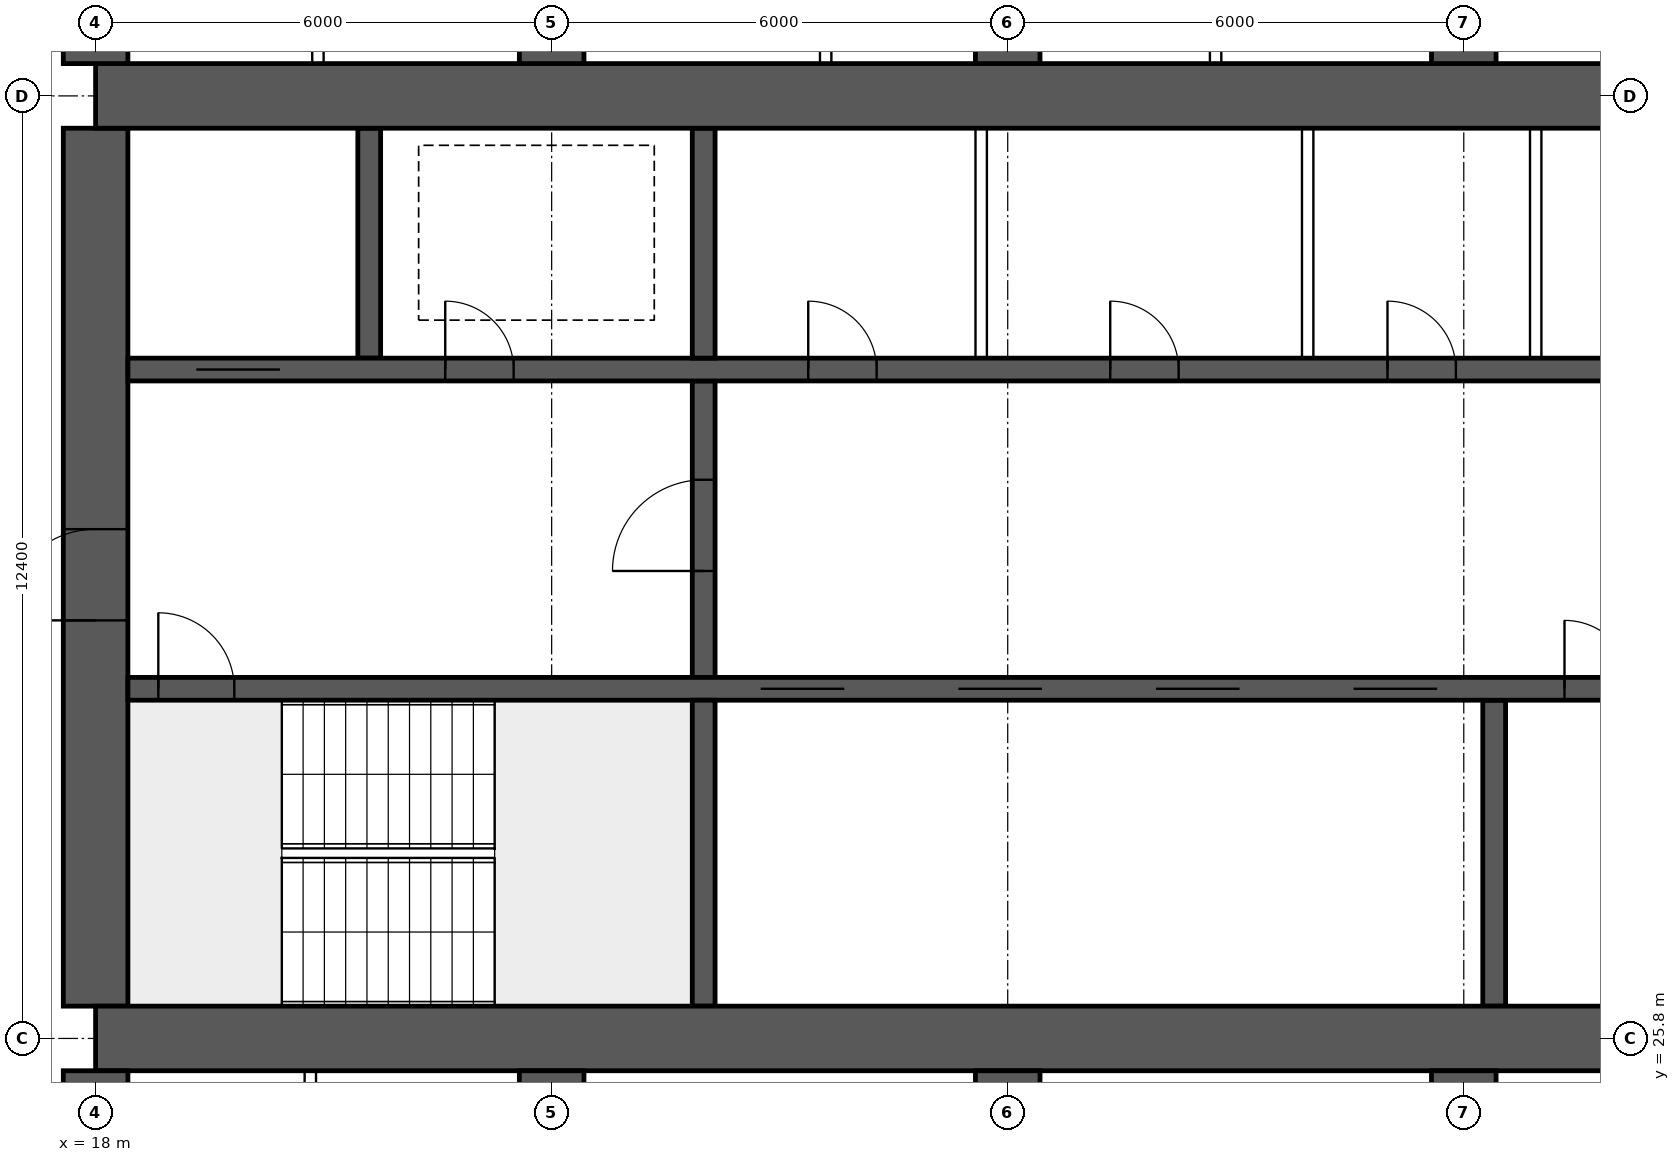
"""IFC4 building model, lengths in metres.
Left out: names, types, materials, properties, quantities, classifications, styles, units other than length and angle.
Written with IfcOpenShell. Run it as: python <this file> out.ifc"""

import sys

from ifc_helpers import new_model, si_unit, direction, frame, frame_2d, origin, place, context, subcontext, project, spatial, rectangle, extrude, element, fill, save


model = new_model("IFC4")
c1 = context("Model", 3, precision=1e-05, world=origin(), true_north=direction((0.0, 1.0)))
c2 = subcontext(c1, "Body", "Model", "MODEL_VIEW")
j1 = project(units=[si_unit("LENGTHUNIT", "METRE"), si_unit("PLANEANGLEUNIT", "RADIAN")], contexts=[c1])
p1 = place(None, origin())
s1 = spatial("IfcSite", under=j1, at=p1, CompositionType="ELEMENT")
p2 = place(p1, origin())
s2 = spatial("IfcBuilding", under=s1, at=p2, CompositionType="ELEMENT")
p3 = place(p2, frame((0.0, 0.0, 193.6)))
s3 = spatial("IfcBuildingStorey", under=s2, at=p3, CompositionType="ELEMENT", Elevation=193.6)
for number, where, z_axis, x_axis in (
    (1, (18.0, 25.8, 0.0), (0.0, 0.0, 1.0), (1.0, 0.0, 0.0)),
    (2, (18.0, 38.2, 0.0), (0.0, 0.0, 1.0), (1.0, 0.0, 0.0)),
):
    element("IfcWall", number, at=place(p3, frame(where, z_axis=z_axis, x_axis=x_axis)), inside=s3, PredefinedType="SHEAR", context=c2, shape_type="SweptSolid", body=[
        extrude(rectangle(XDim=48.0, YDim=0.85, at=frame_2d((24.0, 0.0))), origin(), (0.0, 0.0, 1.0), 3.75),
    ])
p4 = place(p3, frame((18.0, 26.225, 0.0), z_axis=(0.0, 0.0, 1.0), x_axis=(0.0, 1.0, 0.0)))
e3 = element("IfcWall", 3, at=p4, inside=s3, PredefinedType="SHEAR", context=c2, shape_type="SweptSolid", body=[
    extrude(rectangle(XDim=11.55, YDim=0.85, at=frame_2d((5.775, 0.0))), origin(), (0.0, 0.0, 1.0), 3.75),
])
p5 = place(p4, frame((5.075, 0.0, 0.0)))
e4 = element("IfcOpeningElement", 4, at=p5, cuts=e3, PredefinedType="OPENING", context=c2, shape_type="SweptSolid", body=[
    extrude(rectangle(XDim=1.2, YDim=2.1, at=frame_2d((0.6, 1.05))), frame((0.0, 0.435, 0.0), z_axis=(0.0, -1.0, 0.0), x_axis=(1.0, 0.0, 0.0)), (0.0, 0.0, 1.0), 0.87),
])
p6 = place(p3, frame((18.425, 30.4, 0.0), z_axis=(0.0, 0.0, 1.0), x_axis=(1.0, 0.0, 0.0)))
e5 = element("IfcWall", 5, at=p6, inside=s3, PredefinedType="SHEAR", context=c2, shape_type="SweptSolid", body=[
    extrude(rectangle(XDim=47.15, YDim=0.3, at=frame_2d((23.575, 0.0))), origin(), (0.0, 0.0, 1.0), 3.75),
])
p7 = place(p6, frame((0.4, 0.0, 0.0)))
e6 = element("IfcOpeningElement", 6, at=p7, cuts=e5, PredefinedType="OPENING", context=c2, shape_type="SweptSolid", body=[
    extrude(rectangle(XDim=1.0, YDim=2.1, at=frame_2d((0.5, 1.05))), frame((0.0, 0.16, 0.0), z_axis=(0.0, -1.0, 0.0), x_axis=(1.0, 0.0, 0.0)), (0.0, 0.0, 1.0), 0.32),
])
p8 = place(p6, frame((45.75, 0.0, 0.0)))
e7 = element("IfcOpeningElement", 7, at=p8, cuts=e5, PredefinedType="OPENING", context=c2, shape_type="SweptSolid", body=[
    extrude(rectangle(XDim=1.0, YDim=2.1, at=frame_2d((0.5, 1.05))), frame((0.0, 0.16, 0.0), z_axis=(0.0, -1.0, 0.0), x_axis=(1.0, 0.0, 0.0)), (0.0, 0.0, 1.0), 0.32),
])
p9 = place(p6, frame((8.325, 0.0, 0.0)))
e8 = element("IfcOpeningElement", 8, at=p9, cuts=e5, PredefinedType="OPENING", context=c2, shape_type="SweptSolid", body=[
    extrude(rectangle(XDim=1.1, YDim=2.1, at=frame_2d((0.55, 1.05))), frame((0.0, 0.16, 0.0), z_axis=(0.0, -1.0, 0.0), x_axis=(1.0, 0.0, 0.0)), (0.0, 0.0, 1.0), 0.32),
])
p10 = place(p6, frame((10.925, 0.0, 0.0)))
e9 = element("IfcOpeningElement", 9, at=p10, cuts=e5, PredefinedType="OPENING", context=c2, shape_type="SweptSolid", body=[
    extrude(rectangle(XDim=1.1, YDim=2.1, at=frame_2d((0.55, 1.05))), frame((0.0, 0.16, 0.0), z_axis=(0.0, -1.0, 0.0), x_axis=(1.0, 0.0, 0.0)), (0.0, 0.0, 1.0), 0.32),
])
p11 = place(p6, frame((13.525, 0.0, 0.0)))
e10 = element("IfcOpeningElement", 10, at=p11, cuts=e5, PredefinedType="OPENING", context=c2, shape_type="SweptSolid", body=[
    extrude(rectangle(XDim=1.1, YDim=2.1, at=frame_2d((0.55, 1.05))), frame((0.0, 0.16, 0.0), z_axis=(0.0, -1.0, 0.0), x_axis=(1.0, 0.0, 0.0)), (0.0, 0.0, 1.0), 0.32),
])
p12 = place(p6, frame((16.125, 0.0, 0.0)))
e11 = element("IfcOpeningElement", 11, at=p12, cuts=e5, PredefinedType="OPENING", context=c2, shape_type="SweptSolid", body=[
    extrude(rectangle(XDim=1.1, YDim=2.1, at=frame_2d((0.55, 1.05))), frame((0.0, 0.16, 0.0), z_axis=(0.0, -1.0, 0.0), x_axis=(1.0, 0.0, 0.0)), (0.0, 0.0, 1.0), 0.32),
])
p13 = place(p6, frame((18.9, 0.0, 0.0)))
e12 = element("IfcOpeningElement", 12, at=p13, cuts=e5, PredefinedType="OPENING", context=c2, shape_type="SweptSolid", body=[
    extrude(rectangle(XDim=0.9, YDim=2.1, at=frame_2d((0.45, 1.05))), frame((0.0, 0.16, 0.0), z_axis=(0.0, -1.0, 0.0), x_axis=(1.0, 0.0, 0.0)), (0.0, 0.0, 1.0), 0.32),
])
p14 = place(p6, frame((30.192, 0.0, 0.0)))
e13 = element("IfcOpeningElement", 13, at=p14, cuts=e5, PredefinedType="OPENING", context=c2, shape_type="SweptSolid", body=[
    extrude(rectangle(XDim=1.1, YDim=2.1, at=frame_2d((0.55, 1.05))), frame((0.0, 0.16, 0.0), z_axis=(0.0, -1.0, 0.0), x_axis=(1.0, 0.0, 0.0)), (0.0, 0.0, 1.0), 0.32),
])
p15 = place(p6, frame((33.725, 0.0, 0.0)))
e14 = element("IfcOpeningElement", 14, at=p15, cuts=e5, PredefinedType="OPENING", context=c2, shape_type="SweptSolid", body=[
    extrude(rectangle(XDim=1.1, YDim=2.1, at=frame_2d((0.55, 1.05))), frame((0.0, 0.16, 0.0), z_axis=(0.0, -1.0, 0.0), x_axis=(1.0, 0.0, 0.0)), (0.0, 0.0, 1.0), 0.32),
])
p16 = place(p6, frame((37.258, 0.0, 0.0)))
e15 = element("IfcOpeningElement", 15, at=p16, cuts=e5, PredefinedType="OPENING", context=c2, shape_type="SweptSolid", body=[
    extrude(rectangle(XDim=1.1, YDim=2.1, at=frame_2d((0.55, 1.05))), frame((0.0, 0.16, 0.0), z_axis=(0.0, -1.0, 0.0), x_axis=(1.0, 0.0, 0.0)), (0.0, 0.0, 1.0), 0.32),
])
p17 = place(p3, frame((18.425, 34.6, 0.0), z_axis=(0.0, 0.0, 1.0), x_axis=(1.0, 0.0, 0.0)))
e16 = element("IfcWall", 16, at=p17, inside=s3, PredefinedType="SHEAR", context=c2, shape_type="SweptSolid", body=[
    extrude(rectangle(XDim=47.15, YDim=0.3, at=frame_2d((23.575, 0.0))), origin(), (0.0, 0.0, 1.0), 3.75),
])
p18 = place(p17, frame((0.9, 0.0, 0.0)))
e17 = element("IfcOpeningElement", 17, at=p18, cuts=e16, PredefinedType="OPENING", context=c2, shape_type="SweptSolid", body=[
    extrude(rectangle(XDim=1.1, YDim=2.1, at=frame_2d((0.55, 1.05))), frame((0.0, 0.16, 0.0), z_axis=(0.0, -1.0, 0.0), x_axis=(1.0, 0.0, 0.0)), (0.0, 0.0, 1.0), 0.32),
])
p19 = place(p17, frame((45.15, 0.0, 0.0)))
e18 = element("IfcOpeningElement", 18, at=p19, cuts=e16, PredefinedType="OPENING", context=c2, shape_type="SweptSolid", body=[
    extrude(rectangle(XDim=1.1, YDim=2.1, at=frame_2d((0.55, 1.05))), frame((0.0, 0.16, 0.0), z_axis=(0.0, -1.0, 0.0), x_axis=(1.0, 0.0, 0.0)), (0.0, 0.0, 1.0), 0.32),
])
p20 = place(p17, frame((4.175, 0.0, 0.0)))
e19 = element("IfcOpeningElement", 19, at=p20, cuts=e16, PredefinedType="OPENING", context=c2, shape_type="SweptSolid", body=[
    extrude(rectangle(XDim=0.9, YDim=2.1, at=frame_2d((0.45, 1.05))), frame((0.0, 0.16, 0.0), z_axis=(0.0, -1.0, 0.0), x_axis=(1.0, 0.0, 0.0)), (0.0, 0.0, 1.0), 0.32),
])
p21 = place(p17, frame((42.075, 0.0, 0.0)))
e20 = element("IfcOpeningElement", 20, at=p21, cuts=e16, PredefinedType="OPENING", context=c2, shape_type="SweptSolid", body=[
    extrude(rectangle(XDim=0.9, YDim=2.1, at=frame_2d((0.45, 1.05))), frame((0.0, 0.16, 0.0), z_axis=(0.0, -1.0, 0.0), x_axis=(1.0, 0.0, 0.0)), (0.0, 0.0, 1.0), 0.32),
])
p22 = place(p17, frame((8.95, 0.0, 0.0)))
e21 = element("IfcOpeningElement", 21, at=p22, cuts=e16, PredefinedType="OPENING", context=c2, shape_type="SweptSolid", body=[
    extrude(rectangle(XDim=0.9, YDim=2.1, at=frame_2d((0.45, 1.05))), frame((0.0, 0.16, 0.0), z_axis=(0.0, -1.0, 0.0), x_axis=(1.0, 0.0, 0.0)), (0.0, 0.0, 1.0), 0.32),
])
p23 = place(p17, frame((12.924, 0.0, 0.0)))
e22 = element("IfcOpeningElement", 22, at=p23, cuts=e16, PredefinedType="OPENING", context=c2, shape_type="SweptSolid", body=[
    extrude(rectangle(XDim=0.9, YDim=2.1, at=frame_2d((0.45, 1.05))), frame((0.0, 0.16, 0.0), z_axis=(0.0, -1.0, 0.0), x_axis=(1.0, 0.0, 0.0)), (0.0, 0.0, 1.0), 0.32),
])
p24 = place(p17, frame((16.571, 0.0, 0.0)))
e23 = element("IfcOpeningElement", 23, at=p24, cuts=e16, PredefinedType="OPENING", context=c2, shape_type="SweptSolid", body=[
    extrude(rectangle(XDim=0.9, YDim=2.1, at=frame_2d((0.45, 1.05))), frame((0.0, 0.16, 0.0), z_axis=(0.0, -1.0, 0.0), x_axis=(1.0, 0.0, 0.0)), (0.0, 0.0, 1.0), 0.32),
])
p25 = place(p17, frame((20.33, 0.0, 0.0)))
e24 = element("IfcOpeningElement", 24, at=p25, cuts=e16, PredefinedType="OPENING", context=c2, shape_type="SweptSolid", body=[
    extrude(rectangle(XDim=0.9, YDim=2.1, at=frame_2d((0.45, 1.05))), frame((0.0, 0.16, 0.0), z_axis=(0.0, -1.0, 0.0), x_axis=(1.0, 0.0, 0.0)), (0.0, 0.0, 1.0), 0.32),
])
p26 = place(p17, frame((24.736, 0.0, 0.0)))
e25 = element("IfcOpeningElement", 25, at=p26, cuts=e16, PredefinedType="OPENING", context=c2, shape_type="SweptSolid", body=[
    extrude(rectangle(XDim=0.9, YDim=2.1, at=frame_2d((0.45, 1.05))), frame((0.0, 0.16, 0.0), z_axis=(0.0, -1.0, 0.0), x_axis=(1.0, 0.0, 0.0)), (0.0, 0.0, 1.0), 0.32),
])
p27 = place(p17, frame((27.533, 0.0, 0.0)))
e26 = element("IfcOpeningElement", 26, at=p27, cuts=e16, PredefinedType="OPENING", context=c2, shape_type="SweptSolid", body=[
    extrude(rectangle(XDim=0.9, YDim=2.1, at=frame_2d((0.45, 1.05))), frame((0.0, 0.16, 0.0), z_axis=(0.0, -1.0, 0.0), x_axis=(1.0, 0.0, 0.0)), (0.0, 0.0, 1.0), 0.32),
])
p28 = place(p17, frame((29.703, 0.0, 0.0)))
e27 = element("IfcOpeningElement", 27, at=p28, cuts=e16, PredefinedType="OPENING", context=c2, shape_type="SweptSolid", body=[
    extrude(rectangle(XDim=0.9, YDim=2.1, at=frame_2d((0.45, 1.05))), frame((0.0, 0.16, 0.0), z_axis=(0.0, -1.0, 0.0), x_axis=(1.0, 0.0, 0.0)), (0.0, 0.0, 1.0), 0.32),
])
p29 = place(p17, frame((33.502, 0.0, 0.0)))
e28 = element("IfcOpeningElement", 28, at=p29, cuts=e16, PredefinedType="OPENING", context=c2, shape_type="SweptSolid", body=[
    extrude(rectangle(XDim=0.9, YDim=2.1, at=frame_2d((0.45, 1.05))), frame((0.0, 0.16, 0.0), z_axis=(0.0, -1.0, 0.0), x_axis=(1.0, 0.0, 0.0)), (0.0, 0.0, 1.0), 0.32),
])
p30 = place(p17, frame((37.453, 0.0, 0.0)))
e29 = element("IfcOpeningElement", 29, at=p30, cuts=e16, PredefinedType="OPENING", context=c2, shape_type="SweptSolid", body=[
    extrude(rectangle(XDim=0.9, YDim=2.1, at=frame_2d((0.45, 1.05))), frame((0.0, 0.16, 0.0), z_axis=(0.0, -1.0, 0.0), x_axis=(1.0, 0.0, 0.0)), (0.0, 0.0, 1.0), 0.32),
])
p31 = place(p3, frame((26.0, 26.225, 0.0), z_axis=(0.0, 0.0, 1.0), x_axis=(0.0, 1.0, 0.0)))
e30 = element("IfcWall", 30, at=p31, inside=s3, PredefinedType="SHEAR", context=c2, shape_type="SweptSolid", body=[
    extrude(rectangle(XDim=4.025, YDim=0.3, at=frame_2d((2.012, 0.0))), origin(), (0.0, 0.0, 1.0), 3.75),
])
p32 = place(p3, frame((26.0, 30.55, 0.0), z_axis=(0.0, 0.0, 1.0), x_axis=(0.0, 1.0, 0.0)))
e31 = element("IfcWall", 31, at=p32, inside=s3, PredefinedType="SHEAR", context=c2, shape_type="SweptSolid", body=[
    extrude(rectangle(XDim=3.9, YDim=0.3, at=frame_2d((1.95, 0.0))), origin(), (0.0, 0.0, 1.0), 3.75),
])
p33 = place(p32, frame((1.4, 0.0, 0.0)))
e32 = element("IfcOpeningElement", 32, at=p33, cuts=e31, PredefinedType="OPENING", context=c2, shape_type="SweptSolid", body=[
    extrude(rectangle(XDim=1.2, YDim=2.1, at=frame_2d((0.6, 1.05))), frame((0.0, 0.16, 0.0), z_axis=(0.0, -1.0, 0.0), x_axis=(1.0, 0.0, 0.0)), (0.0, 0.0, 1.0), 0.32),
])
for number, where, z_axis, x_axis in (
    (33, (21.6, 34.75, 0.0), (0.0, 0.0, 1.0), (0.0, 1.0, 0.0)),
    (34, (26.0, 34.75, 0.0), (0.0, 0.0, 1.0), (0.0, 1.0, 0.0)),
):
    element("IfcWall", number, at=place(p3, frame(where, z_axis=z_axis, x_axis=x_axis)), inside=s3, PredefinedType="SHEAR", context=c2, shape_type="SweptSolid", body=[
        extrude(rectangle(XDim=3.025, YDim=0.3, at=frame_2d((1.512, 0.0))), origin(), (0.0, 0.0, 1.0), 3.75),
    ])
p34 = place(p3, frame((36.4, 26.225, 0.0), z_axis=(0.0, 0.0, 1.0), x_axis=(0.0, 1.0, 0.0)))
e35 = element("IfcWall", 35, at=p34, inside=s3, PredefinedType="SHEAR", context=c2, shape_type="SweptSolid", body=[
    extrude(rectangle(XDim=4.025, YDim=0.3, at=frame_2d((2.012, 0.0))), origin(), (0.0, 0.0, 1.0), 3.75),
])
for number, where, z_axis, x_axis in (
    (36, (18.0, 17.2, 0.0), (0.0, 0.0, 1.0), (0.0, 1.0, 0.0)),
    (37, (18.0, 38.625, 0.0), (0.0, 0.0, 1.0), (0.0, 1.0, 0.0)),
    (38, (24.0, 17.2, 0.0), (0.0, 0.0, 1.0), (0.0, 1.0, 0.0)),
    (39, (24.0, 38.625, 0.0), (0.0, 0.0, 1.0), (0.0, 1.0, 0.0)),
    (40, (30.0, 17.2, 0.0), (0.0, 0.0, 1.0), (0.0, 1.0, 0.0)),
    (41, (30.0, 38.625, 0.0), (0.0, 0.0, 1.0), (0.0, 1.0, 0.0)),
    (42, (36.0, 17.2, 0.0), (0.0, 0.0, 1.0), (0.0, 1.0, 0.0)),
    (43, (36.0, 38.625, 0.0), (0.0, 0.0, 1.0), (0.0, 1.0, 0.0)),
):
    element("IfcWall", number, at=place(p3, frame(where, z_axis=z_axis, x_axis=x_axis)), inside=s3, PredefinedType="SHEAR", context=c2, shape_type="SweptSolid", body=[
        extrude(rectangle(XDim=8.175, YDim=0.85, at=frame_2d((4.087, 0.0))), origin(), (0.0, 0.0, 1.0), 3.75),
    ])
for number, where, z_axis, x_axis in (
    (44, (29.651, 34.75, 0.0), (0.0, 0.0, 1.0), (0.0, 1.0, 0.0)),
    (45, (33.946, 34.75, 0.0), (0.0, 0.0, 1.0), (0.0, 1.0, 0.0)),
    (46, (36.946, 34.75, 0.0), (0.0, 0.0, 1.0), (0.0, 1.0, 0.0)),
):
    element("IfcWall", number, at=place(p3, frame(where, z_axis=z_axis, x_axis=x_axis)), inside=s3, PredefinedType="SOLIDWALL", context=c2, shape_type="SweptSolid", body=[
        extrude(rectangle(XDim=3.025, YDim=0.15, at=frame_2d((1.512, 0.0))), origin(), (0.0, 0.0, 1.0), 3.5),
    ])
for number, where, z_axis, x_axis in (
    (47, (20.825, 17.3, 0.0), (0.0, 0.0, 1.0), (0.0, 1.0, 0.0)),
    (48, (20.925, 38.625, 0.0), (0.0, 0.0, 1.0), (0.0, 1.0, 0.0)),
    (49, (27.605, 38.625, 0.0), (0.0, 0.0, 1.0), (0.0, 1.0, 0.0)),
    (50, (32.735, 38.625, 0.0), (0.0, 0.0, 1.0), (0.0, 1.0, 0.0)),
):
    element("IfcWall", number, at=place(p3, frame(where, z_axis=z_axis, x_axis=x_axis)), inside=s3, PredefinedType="PARTITIONING", context=c2, shape_type="SweptSolid", body=[
        extrude(rectangle(XDim=8.075, YDim=0.15, at=frame_2d((4.038, 0.0))), origin(), (0.0, 0.0, 1.0), 3.5),
    ])
p35 = place(p5, origin())
e51 = element("IfcDoor", 51, at=p35, inside=s3, OperationType="SINGLE_SWING_LEFT", PredefinedType="DOOR", context=c2, shape_type="SweptSolid", body=[
    extrude(rectangle(XDim=1.2, YDim=2.1, at=frame_2d((0.6, 1.05))), frame((0.0, 0.025, 0.0), z_axis=(0.0, -1.0, 0.0), x_axis=(1.0, 0.0, 0.0)), (0.0, 0.0, 1.0), 0.05),
])
fill(e4, e51)
p36 = place(p7, origin())
e52 = element("IfcDoor", 52, at=p36, inside=s3, OperationType="SINGLE_SWING_LEFT", PredefinedType="DOOR", context=c2, shape_type="SweptSolid", body=[
    extrude(rectangle(XDim=1.0, YDim=2.1, at=frame_2d((0.5, 1.05))), frame((0.0, 0.025, 0.0), z_axis=(0.0, -1.0, 0.0), x_axis=(1.0, 0.0, 0.0)), (0.0, 0.0, 1.0), 0.05),
])
fill(e6, e52)
p37 = place(p18, origin())
e53 = element("IfcDoor", 53, at=p37, inside=s3, OperationType="DOUBLE_DOOR_SLIDING", PredefinedType="DOOR", context=c2, shape_type="SweptSolid", body=[
    extrude(rectangle(XDim=1.1, YDim=2.1, at=frame_2d((0.55, 1.05))), frame((0.0, 0.025, 0.0), z_axis=(0.0, -1.0, 0.0), x_axis=(1.0, 0.0, 0.0)), (0.0, 0.0, 1.0), 0.05),
])
fill(e17, e53)
p38 = place(p20, origin())
e54 = element("IfcDoor", 54, at=p38, inside=s3, OperationType="SINGLE_SWING_LEFT", PredefinedType="DOOR", context=c2, shape_type="SweptSolid", body=[
    extrude(rectangle(XDim=0.9, YDim=2.1, at=frame_2d((0.45, 1.05))), frame((0.0, 0.025, 0.0), z_axis=(0.0, -1.0, 0.0), x_axis=(1.0, 0.0, 0.0)), (0.0, 0.0, 1.0), 0.05),
])
fill(e19, e54)
p39 = place(p33, origin())
e55 = element("IfcDoor", 55, at=p39, inside=s3, OperationType="SINGLE_SWING_LEFT", PredefinedType="DOOR", context=c2, shape_type="SweptSolid", body=[
    extrude(rectangle(XDim=1.2, YDim=2.1, at=frame_2d((0.6, 1.05))), frame((0.0, 0.025, 0.0), z_axis=(0.0, -1.0, 0.0), x_axis=(1.0, 0.0, 0.0)), (0.0, 0.0, 1.0), 0.05),
])
fill(e32, e55)
p40 = place(p22, origin())
e56 = element("IfcDoor", 56, at=p40, inside=s3, OperationType="SINGLE_SWING_LEFT", PredefinedType="DOOR", context=c2, shape_type="SweptSolid", body=[
    extrude(rectangle(XDim=0.9, YDim=2.1, at=frame_2d((0.45, 1.05))), frame((0.0, 0.025, 0.0), z_axis=(0.0, -1.0, 0.0), x_axis=(1.0, 0.0, 0.0)), (0.0, 0.0, 1.0), 0.05),
])
fill(e21, e56)
p41 = place(p23, origin())
e57 = element("IfcDoor", 57, at=p41, inside=s3, OperationType="SINGLE_SWING_LEFT", PredefinedType="DOOR", context=c2, shape_type="SweptSolid", body=[
    extrude(rectangle(XDim=0.9, YDim=2.1, at=frame_2d((0.45, 1.05))), frame((0.0, 0.025, 0.0), z_axis=(0.0, -1.0, 0.0), x_axis=(1.0, 0.0, 0.0)), (0.0, 0.0, 1.0), 0.05),
])
fill(e22, e57)
p42 = place(p24, origin())
e58 = element("IfcDoor", 58, at=p42, inside=s3, OperationType="SINGLE_SWING_LEFT", PredefinedType="DOOR", context=c2, shape_type="SweptSolid", body=[
    extrude(rectangle(XDim=0.9, YDim=2.1, at=frame_2d((0.45, 1.05))), frame((0.0, 0.025, 0.0), z_axis=(0.0, -1.0, 0.0), x_axis=(1.0, 0.0, 0.0)), (0.0, 0.0, 1.0), 0.05),
])
fill(e23, e58)
p43 = place(p9, origin())
e59 = element("IfcDoor", 59, at=p43, inside=s3, OperationType="DOUBLE_DOOR_SLIDING", PredefinedType="DOOR", context=c2, shape_type="SweptSolid", body=[
    extrude(rectangle(XDim=1.1, YDim=2.1, at=frame_2d((0.55, 1.05))), frame((0.0, 0.025, 0.0), z_axis=(0.0, -1.0, 0.0), x_axis=(1.0, 0.0, 0.0)), (0.0, 0.0, 1.0), 0.05),
])
fill(e8, e59)
p44 = place(p10, origin())
e60 = element("IfcDoor", 60, at=p44, inside=s3, OperationType="DOUBLE_DOOR_SLIDING", PredefinedType="DOOR", context=c2, shape_type="SweptSolid", body=[
    extrude(rectangle(XDim=1.1, YDim=2.1, at=frame_2d((0.55, 1.05))), frame((0.0, 0.025, 0.0), z_axis=(0.0, -1.0, 0.0), x_axis=(1.0, 0.0, 0.0)), (0.0, 0.0, 1.0), 0.05),
])
fill(e9, e60)
p45 = place(p11, origin())
e61 = element("IfcDoor", 61, at=p45, inside=s3, OperationType="DOUBLE_DOOR_SLIDING", PredefinedType="DOOR", context=c2, shape_type="SweptSolid", body=[
    extrude(rectangle(XDim=1.1, YDim=2.1, at=frame_2d((0.55, 1.05))), frame((0.0, 0.025, 0.0), z_axis=(0.0, -1.0, 0.0), x_axis=(1.0, 0.0, 0.0)), (0.0, 0.0, 1.0), 0.05),
])
fill(e10, e61)
p46 = place(p12, origin())
e62 = element("IfcDoor", 62, at=p46, inside=s3, OperationType="DOUBLE_DOOR_SLIDING", PredefinedType="DOOR", context=c2, shape_type="SweptSolid", body=[
    extrude(rectangle(XDim=1.1, YDim=2.1, at=frame_2d((0.55, 1.05))), frame((0.0, 0.025, 0.0), z_axis=(0.0, -1.0, 0.0), x_axis=(1.0, 0.0, 0.0)), (0.0, 0.0, 1.0), 0.05),
])
fill(e11, e62)
p47 = place(p13, origin())
e63 = element("IfcDoor", 63, at=p47, inside=s3, OperationType="SINGLE_SWING_LEFT", PredefinedType="DOOR", context=c2, shape_type="SweptSolid", body=[
    extrude(rectangle(XDim=0.9, YDim=2.1, at=frame_2d((0.45, 1.05))), frame((0.0, 0.025, 0.0), z_axis=(0.0, -1.0, 0.0), x_axis=(1.0, 0.0, 0.0)), (0.0, 0.0, 1.0), 0.05),
])
fill(e12, e63)
save(model, sys.argv[1])
